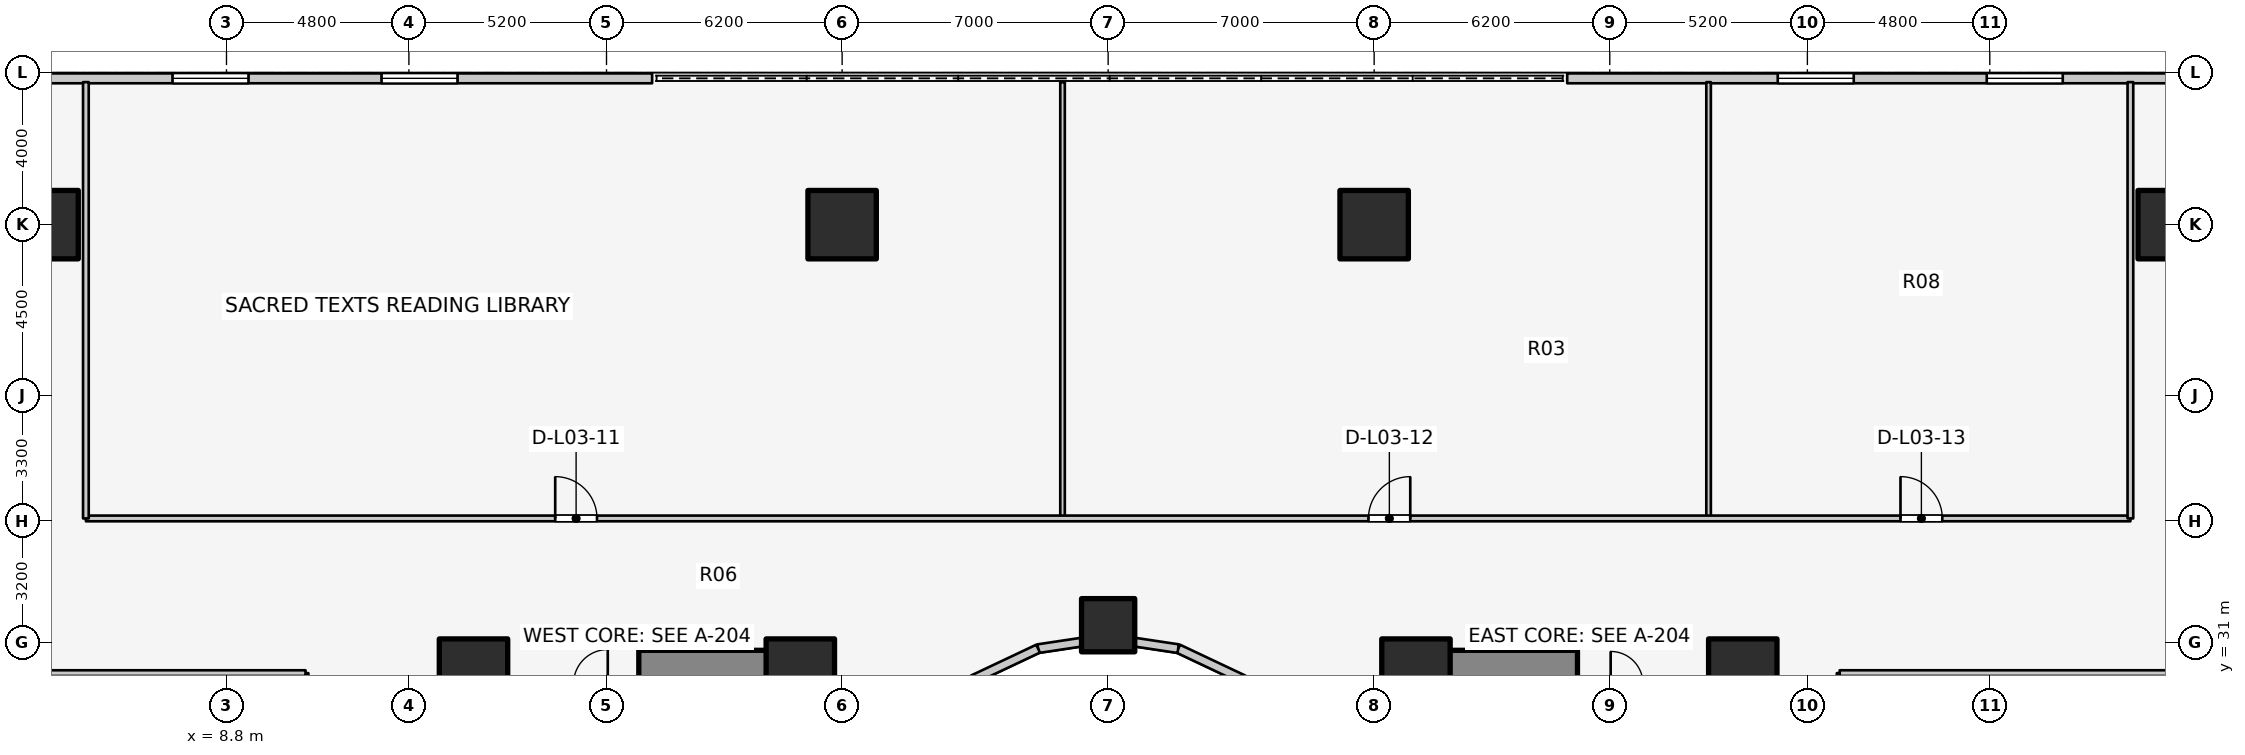
"""IFC4 building model, lengths in metres.
Left out: names, types, materials, properties, quantities, classifications, styles, units other than length and angle.
Written with IfcOpenShell. Run it as: python <this file> out.ifc"""

import sys

from ifc_helpers import new_model, si_unit, direction, frame, frame_2d, origin, origin_2d, place, context, subcontext, project, spatial, rectangle, extrude, element, fill, save


model = new_model("IFC4")
c1 = context("Model", 3, precision=1e-05, world=origin(), true_north=direction((0.0, 1.0)))
c2 = subcontext(c1, "Body", "Model", "MODEL_VIEW")
j1 = project(units=[si_unit("LENGTHUNIT", "METRE"), si_unit("PLANEANGLEUNIT", "RADIAN")], contexts=[c1])
p1 = place(None, origin())
s1 = spatial("IfcSite", under=j1, at=p1, CompositionType="ELEMENT")
p2 = place(p1, origin())
s2 = spatial("IfcBuilding", under=s1, at=p2, CompositionType="ELEMENT")
p3 = place(p2, frame((0.0, 0.0, 9.2)))
s3 = spatial("IfcBuildingStorey", under=s2, at=p3, CompositionType="ELEMENT", Elevation=9.2)
for number, where, z_axis, x_axis in (
    (1, (19.65, 30.35, 0.0), (0.0, 0.0, 1.0), (1.0, 0.0, 0.0)),
    (2, (39.85, 30.35, 0.0), (0.0, 0.0, 1.0), (1.0, 0.0, 0.0)),
):
    element("IfcWall", number, at=place(p3, frame(where, z_axis=z_axis, x_axis=x_axis)), inside=s3, PredefinedType="SHEAR", context=c2, shape_type="SweptSolid", body=[
        extrude(rectangle(XDim=4.5, YDim=0.9, at=frame_2d((2.25, 0.0))), origin(), (0.0, 0.0, 1.0), 4.6),
    ])
for number, where, z_axis, x_axis in (
    (3, (23.9, 30.2, 0.0), (0.0, 0.0, 1.0), (1.0, 0.0, 0.0)),
    (4, (15.3, 30.2, 0.0), (0.0, 0.0, 1.0), (1.0, 0.0, 0.0)),
    (5, (48.7, 30.2, 0.0), (0.0, 0.0, 1.0), (1.0, 0.0, 0.0)),
    (6, (40.1, 30.2, 0.0), (0.0, 0.0, 1.0), (1.0, 0.0, 0.0)),
    (7, (60.0, 42.0, 0.0), (0.0, 0.0, 1.0), (1.0, 0.0, 0.0)),
    (8, (39.0, 42.0, 0.0), (0.0, 0.0, 1.0), (1.0, 0.0, 0.0)),
    (9, (25.0, 42.0, 0.0), (0.0, 0.0, 1.0), (1.0, 0.0, 0.0)),
    (10, (4.0, 42.0, 0.0), (0.0, 0.0, 1.0), (1.0, 0.0, 0.0)),
):
    element("IfcColumn", number, at=place(p3, frame(where, z_axis=z_axis, x_axis=x_axis)), inside=s3, PredefinedType="COLUMN", context=c2, shape_type="SweptSolid", body=[
        extrude(rectangle(XDim=1.8, YDim=1.8, at=origin_2d()), origin(), (0.0, 0.0, 1.0), 4.6),
    ])
p4 = place(p3, frame((32.0, 31.46, 0.0), z_axis=(0.0, 0.0, 1.0), x_axis=(1.0, 0.0, 0.0)))
e11 = element("IfcColumn", 11, at=p4, inside=s3, PredefinedType="COLUMN", context=c2, shape_type="SweptSolid", body=[
    extrude(rectangle(XDim=1.4, YDim=1.4, at=origin_2d()), origin(), (0.0, 0.0, 1.0), 4.6),
])
p5 = place(p3, frame((63.72, 45.85, 0.0), z_axis=(0.0, 0.0, 1.0), x_axis=(-1.0, 0.0, 0.0)))
e12 = element("IfcWall", 12, at=p5, inside=s3, PredefinedType="STANDARD", context=c2, shape_type="SweptSolid", body=[
    extrude(rectangle(XDim=19.64, YDim=0.26, at=frame_2d((9.82, 0.0))), origin(), (0.0, 0.0, 1.0), 4.28),
])
p6 = place(p5, frame((6.6, 0.0, 2.2)))
e13 = element("IfcOpeningElement", 13, at=p6, cuts=e12, PredefinedType="OPENING", context=c2, shape_type="SweptSolid", body=[
    extrude(rectangle(XDim=2.0, YDim=1.1, at=frame_2d((1.0, 0.55))), frame((0.0, 0.14, 0.0), z_axis=(0.0, -1.0, 0.0), x_axis=(1.0, 0.0, 0.0)), (0.0, 0.0, 1.0), 0.28),
])
p7 = place(p5, frame((12.1, 0.0, 2.2)))
e14 = element("IfcOpeningElement", 14, at=p7, cuts=e12, PredefinedType="OPENING", context=c2, shape_type="SweptSolid", body=[
    extrude(rectangle(XDim=2.0, YDim=1.1, at=frame_2d((1.0, 0.55))), frame((0.0, 0.14, 0.0), z_axis=(0.0, -1.0, 0.0), x_axis=(1.0, 0.0, 0.0)), (0.0, 0.0, 1.0), 0.28),
])
p8 = place(p3, frame((20.0, 45.85, 0.0), z_axis=(0.0, 0.0, 1.0), x_axis=(-1.0, 0.0, 0.0)))
e15 = element("IfcWall", 15, at=p8, inside=s3, PredefinedType="STANDARD", context=c2, shape_type="SweptSolid", body=[
    extrude(rectangle(XDim=19.72, YDim=0.26, at=frame_2d((9.86, 0.0))), origin(), (0.0, 0.0, 1.0), 4.28),
])
p9 = place(p8, frame((5.12, 0.0, 2.2)))
e16 = element("IfcOpeningElement", 16, at=p9, cuts=e15, PredefinedType="OPENING", context=c2, shape_type="SweptSolid", body=[
    extrude(rectangle(XDim=2.0, YDim=1.1, at=frame_2d((1.0, 0.55))), frame((0.0, 0.14, 0.0), z_axis=(0.0, -1.0, 0.0), x_axis=(1.0, 0.0, 0.0)), (0.0, 0.0, 1.0), 0.28),
])
p10 = place(p8, frame((10.62, 0.0, 2.2)))
e17 = element("IfcOpeningElement", 17, at=p10, cuts=e15, PredefinedType="OPENING", context=c2, shape_type="SweptSolid", body=[
    extrude(rectangle(XDim=2.0, YDim=1.1, at=frame_2d((1.0, 0.55))), frame((0.0, 0.14, 0.0), z_axis=(0.0, -1.0, 0.0), x_axis=(1.0, 0.0, 0.0)), (0.0, 0.0, 1.0), 0.28),
])
p11 = place(p3, frame((35.56, 30.032, 0.0), z_axis=(0.0, 0.0, 1.0), x_axis=(-0.904179699603, 0.427152280606, 0.0)))
e18 = element("IfcWall", 18, at=p11, inside=s3, PredefinedType="STANDARD", context=c2, shape_type="SweptSolid", body=[
    extrude(rectangle(XDim=1.899, YDim=0.23, at=frame_2d((0.95, 0.0))), origin(), (0.0, 0.0, 1.0), 3.28),
])
for number, where, z_axis, x_axis in (
    (19, (33.843, 30.843, 0.0), (0.0, 0.0, 1.0), (-0.989, 0.149, 0.0)),
    (20, (32.0, 31.12, 0.0), (0.0, 0.0, 1.0), (-0.989, -0.149, 0.0)),
):
    element("IfcWall", number, at=place(p3, frame(where, z_axis=z_axis, x_axis=x_axis)), inside=s3, PredefinedType="STANDARD", context=c2, shape_type="SweptSolid", body=[
        extrude(rectangle(XDim=1.864, YDim=0.23, at=frame_2d((0.932, 0.0))), origin(), (0.0, 0.0, 1.0), 3.28),
    ])
p12 = place(p3, frame((30.157, 30.843, 0.0), z_axis=(0.0, 0.0, 1.0), x_axis=(-0.904179699603, -0.427152280606, 0.0)))
e21 = element("IfcWall", 21, at=p12, inside=s3, PredefinedType="STANDARD", context=c2, shape_type="SweptSolid", body=[
    extrude(rectangle(XDim=1.899, YDim=0.23, at=frame_2d((0.95, 0.0))), origin(), (0.0, 0.0, 1.0), 3.28),
])
for number, where, z_axis, x_axis in (
    (22, (30.8, 34.32, 0.0), (0.0, 0.0, 1.0), (0.0, 1.0, 0.0)),
    (23, (47.8, 34.32, 0.0), (0.0, 0.0, 1.0), (0.0, 1.0, 0.0)),
):
    element("IfcWall", number, at=place(p3, frame(where, z_axis=z_axis, x_axis=x_axis)), inside=s3, PredefinedType="MOVABLE", context=c2, shape_type="SweptSolid", body=[
        extrude(rectangle(XDim=11.43, YDim=0.12, at=frame_2d((5.715, 0.0))), origin(), (0.0, 0.0, 1.0), 3.3),
    ])
p13 = place(p3, frame((5.1, 34.27, 0.0), z_axis=(0.0, 0.0, 1.0), x_axis=(1.0, 0.0, 0.0)))
e24 = element("IfcWall", 24, at=p13, inside=s3, PredefinedType="PARTITIONING", context=c2, shape_type="SweptSolid", body=[
    extrude(rectangle(XDim=53.8, YDim=0.15, at=frame_2d((26.9, 0.0))), origin(), (0.0, 0.0, 1.0), 3.3),
])
p14 = place(p13, frame((12.35, 0.0, 0.0)))
e25 = element("IfcOpeningElement", 25, at=p14, cuts=e24, PredefinedType="OPENING", context=c2, shape_type="SweptSolid", body=[
    extrude(rectangle(XDim=1.1, YDim=2.1, at=frame_2d((0.55, 1.05))), frame((0.0, 0.085, 0.0), z_axis=(0.0, -1.0, 0.0), x_axis=(1.0, 0.0, 0.0)), (0.0, 0.0, 1.0), 0.17),
])
p15 = place(p13, frame((33.75, 0.0, 0.0)))
e26 = element("IfcOpeningElement", 26, at=p15, cuts=e24, PredefinedType="OPENING", context=c2, shape_type="SweptSolid", body=[
    extrude(rectangle(XDim=1.1, YDim=2.1, at=frame_2d((0.55, 1.05))), frame((0.0, 0.085, 0.0), z_axis=(0.0, -1.0, 0.0), x_axis=(1.0, 0.0, 0.0)), (0.0, 0.0, 1.0), 0.17),
])
p16 = place(p13, frame((47.75, 0.0, 0.0)))
e27 = element("IfcOpeningElement", 27, at=p16, cuts=e24, PredefinedType="OPENING", context=c2, shape_type="SweptSolid", body=[
    extrude(rectangle(XDim=1.1, YDim=2.1, at=frame_2d((0.55, 1.05))), frame((0.0, 0.085, 0.0), z_axis=(0.0, -1.0, 0.0), x_axis=(1.0, 0.0, 0.0)), (0.0, 0.0, 1.0), 0.17),
])
for number, where, z_axis, x_axis in (
    (28, (5.1, 34.27, 0.0), (0.0, 0.0, 1.0), (0.0, 1.0, 0.0)),
    (29, (58.9, 34.27, 0.0), (0.0, 0.0, 1.0), (0.0, 1.0, 0.0)),
):
    element("IfcWall", number, at=place(p3, frame(where, z_axis=z_axis, x_axis=x_axis)), inside=s3, PredefinedType="PARTITIONING", context=c2, shape_type="SweptSolid", body=[
        extrude(rectangle(XDim=11.48, YDim=0.15, at=frame_2d((5.74, 0.0))), origin(), (0.0, 0.0, 1.0), 3.3),
    ])
p17 = place(p3, frame((51.25, 16.75, 0.0), z_axis=(0.0, 0.0, 1.0), x_axis=(0.0, 1.0, 0.0)))
e30 = element("IfcWall", 30, at=p17, inside=s3, PredefinedType="PARTITIONING", context=c2, shape_type="SweptSolid", body=[
    extrude(rectangle(XDim=13.45, YDim=0.15, at=frame_2d((6.725, 0.0))), origin(), (0.0, 0.0, 1.0), 4.255),
])
p18 = place(p17, frame((6.175, 0.0, 0.0)))
e31 = element("IfcOpeningElement", 31, at=p18, cuts=e30, PredefinedType="OPENING", context=c2, shape_type="SweptSolid", body=[
    extrude(rectangle(XDim=1.1, YDim=2.1, at=frame_2d((0.55, 1.05))), frame((0.0, 0.085, 0.0), z_axis=(0.0, -1.0, 0.0), x_axis=(1.0, 0.0, 0.0)), (0.0, 0.0, 1.0), 0.17),
])
p19 = place(p3, frame((51.25, 30.2, 0.0), z_axis=(0.0, 0.0, 1.0), x_axis=(1.0, 0.0, 0.0)))
e32 = element("IfcWall", 32, at=p19, inside=s3, PredefinedType="PARTITIONING", context=c2, shape_type="SweptSolid", body=[
    extrude(rectangle(XDim=12.53, YDim=0.15, at=frame_2d((6.265, 0.0))), origin(), (0.0, 0.0, 1.0), 3.3),
])
p20 = place(p3, frame((10.88, 19.12, 0.0), z_axis=(0.0, 0.0, 1.0), x_axis=(0.0, 1.0, 0.0)))
e33 = element("IfcWall", 33, at=p20, inside=s3, PredefinedType="PARTITIONING", context=c2, shape_type="SweptSolid", body=[
    extrude(rectangle(XDim=11.08, YDim=0.15, at=frame_2d((5.54, 0.0))), origin(), (0.0, 0.0, 1.0), 3.62),
])
p21 = place(p3, frame((0.25, 30.2, 0.0), z_axis=(0.0, 0.0, 1.0), x_axis=(1.0, 0.0, 0.0)))
e34 = element("IfcWall", 34, at=p21, inside=s3, PredefinedType="PARTITIONING", context=c2, shape_type="SweptSolid", body=[
    extrude(rectangle(XDim=10.63, YDim=0.15, at=frame_2d((5.315, 0.0))), origin(), (0.0, 0.0, 1.0), 3.3),
])
p22 = place(p6, origin())
e35 = element("IfcWindow", 35, at=p22, inside=s3, PartitioningType="SINGLE_PANEL", PredefinedType="WINDOW", context=c2, shape_type="SweptSolid", body=[
    extrude(rectangle(XDim=2.0, YDim=1.1, at=frame_2d((1.0, 0.55))), frame((0.0, 0.03, 0.0), z_axis=(0.0, -1.0, 0.0), x_axis=(1.0, 0.0, 0.0)), (0.0, 0.0, 1.0), 0.06),
])
fill(e13, e35)
p23 = place(p7, origin())
e36 = element("IfcWindow", 36, at=p23, inside=s3, PartitioningType="SINGLE_PANEL", PredefinedType="WINDOW", context=c2, shape_type="SweptSolid", body=[
    extrude(rectangle(XDim=2.0, YDim=1.1, at=frame_2d((1.0, 0.55))), frame((0.0, 0.03, 0.0), z_axis=(0.0, -1.0, 0.0), x_axis=(1.0, 0.0, 0.0)), (0.0, 0.0, 1.0), 0.06),
])
fill(e14, e36)
p24 = place(p9, origin())
e37 = element("IfcWindow", 37, at=p24, inside=s3, PartitioningType="SINGLE_PANEL", PredefinedType="WINDOW", context=c2, shape_type="SweptSolid", body=[
    extrude(rectangle(XDim=2.0, YDim=1.1, at=frame_2d((1.0, 0.55))), frame((0.0, 0.03, 0.0), z_axis=(0.0, -1.0, 0.0), x_axis=(1.0, 0.0, 0.0)), (0.0, 0.0, 1.0), 0.06),
])
fill(e16, e37)
p25 = place(p10, origin())
e38 = element("IfcWindow", 38, at=p25, inside=s3, PartitioningType="SINGLE_PANEL", PredefinedType="WINDOW", context=c2, shape_type="SweptSolid", body=[
    extrude(rectangle(XDim=2.0, YDim=1.1, at=frame_2d((1.0, 0.55))), frame((0.0, 0.03, 0.0), z_axis=(0.0, -1.0, 0.0), x_axis=(1.0, 0.0, 0.0)), (0.0, 0.0, 1.0), 0.06),
])
fill(e17, e38)
p26 = place(p14, origin())
e39 = element("IfcDoor", 39, at=p26, inside=s3, OperationType="SINGLE_SWING_LEFT", PredefinedType="DOOR", context=c2, shape_type="SweptSolid", body=[
    extrude(rectangle(XDim=1.1, YDim=2.1, at=frame_2d((0.55, 1.05))), frame((0.0, 0.025, 0.0), z_axis=(0.0, -1.0, 0.0), x_axis=(1.0, 0.0, 0.0)), (0.0, 0.0, 1.0), 0.05),
])
fill(e25, e39)
p27 = place(p15, origin())
e40 = element("IfcDoor", 40, at=p27, inside=s3, OperationType="SINGLE_SWING_RIGHT", PredefinedType="DOOR", context=c2, shape_type="SweptSolid", body=[
    extrude(rectangle(XDim=1.1, YDim=2.1, at=frame_2d((0.55, 1.05))), frame((0.0, 0.025, 0.0), z_axis=(0.0, -1.0, 0.0), x_axis=(1.0, 0.0, 0.0)), (0.0, 0.0, 1.0), 0.05),
])
fill(e26, e40)
p28 = place(p16, origin())
e41 = element("IfcDoor", 41, at=p28, inside=s3, OperationType="SINGLE_SWING_LEFT", PredefinedType="DOOR", context=c2, shape_type="SweptSolid", body=[
    extrude(rectangle(XDim=1.1, YDim=2.1, at=frame_2d((0.55, 1.05))), frame((0.0, 0.025, 0.0), z_axis=(0.0, -1.0, 0.0), x_axis=(1.0, 0.0, 0.0)), (0.0, 0.0, 1.0), 0.05),
])
fill(e27, e41)
save(model, sys.argv[1])
